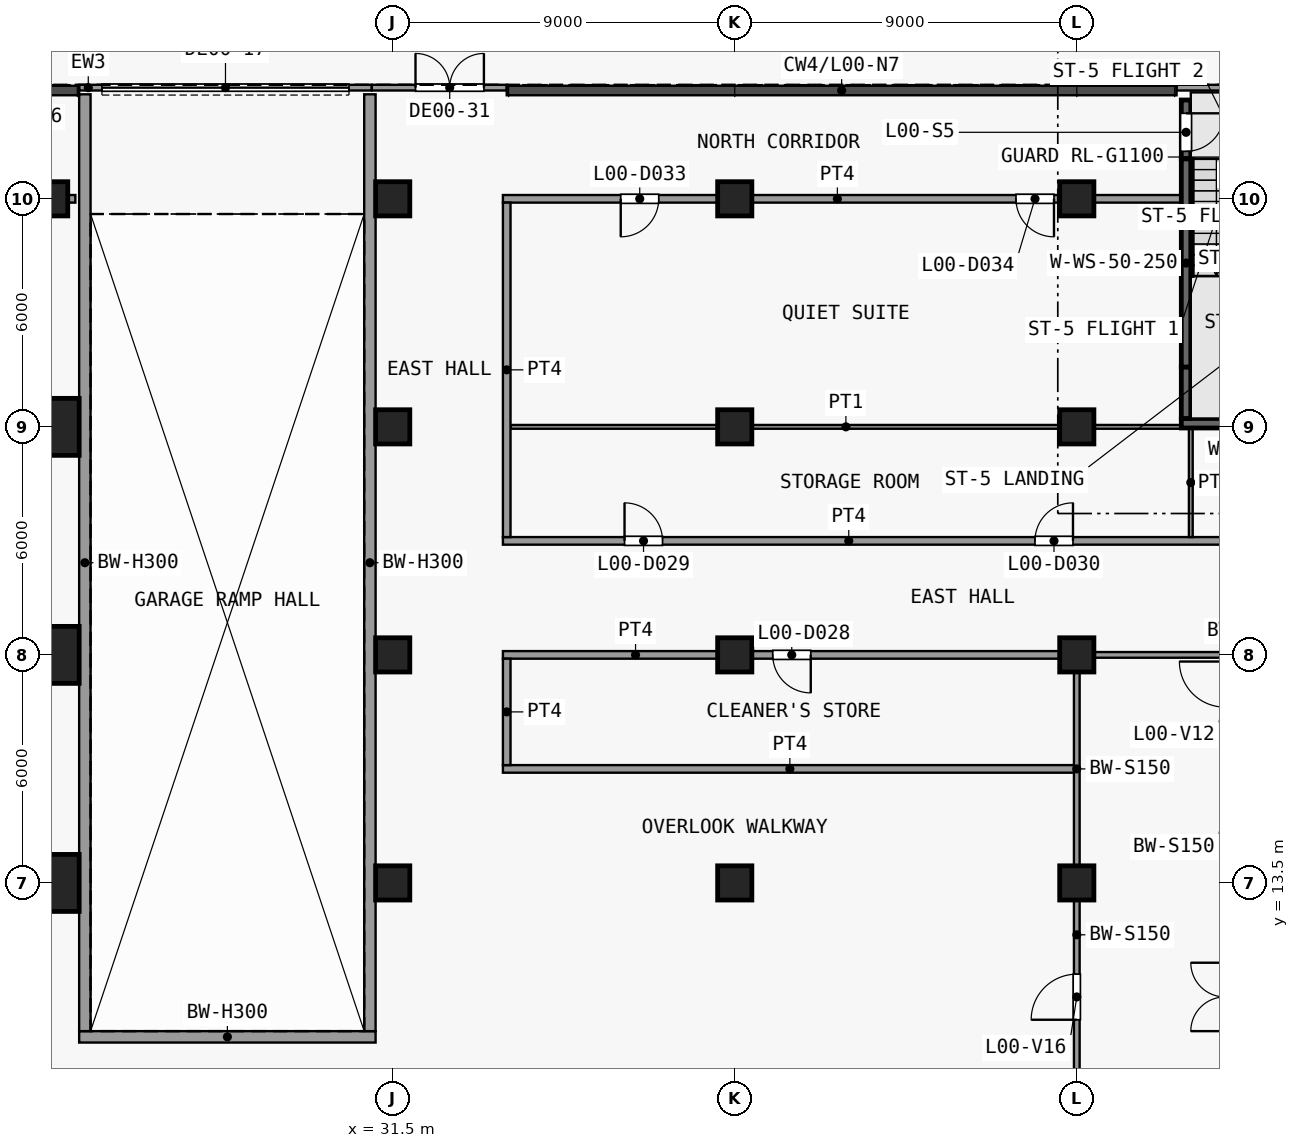
"""IFC4 building model, lengths in metres.
Left out: names, types, materials, properties, quantities, classifications, styles, units other than length and angle.
Written with IfcOpenShell. Run it as: python <this file> out.ifc"""

import sys

from ifc_helpers import new_model, si_unit, direction, frame, frame_2d, origin, origin_2d, place, context, subcontext, project, spatial, rectangle, extrude, element, fill, save


model = new_model("IFC4")
c1 = context("Model", 3, precision=1e-05, world=origin(), true_north=direction((0.0, 1.0)))
c2 = subcontext(c1, "Body", "Model", "MODEL_VIEW")
j1 = project(units=[si_unit("LENGTHUNIT", "METRE"), si_unit("PLANEANGLEUNIT", "RADIAN")], contexts=[c1])
p1 = place(None, origin())
s1 = spatial("IfcSite", under=j1, at=p1, CompositionType="ELEMENT")
p2 = place(p1, origin())
s2 = spatial("IfcBuilding", under=s1, at=p2, CompositionType="ELEMENT")
p3 = place(p2, origin())
s3 = spatial("IfcBuildingStorey", under=s2, at=p3, CompositionType="ELEMENT", Elevation=0.0)
for number, where, z_axis, x_axis in (
    (1, (22.5, 13.5, 0.0), (0.0, 0.0, 1.0), (1.0, 0.0, 0.0)),
    (2, (22.5, 19.5, 0.0), (0.0, 0.0, 1.0), (1.0, 0.0, 0.0)),
    (3, (22.5, 25.5, 0.0), (0.0, 0.0, 1.0), (1.0, 0.0, 0.0)),
):
    element("IfcColumn", number, at=place(p3, frame(where, z_axis=z_axis, x_axis=x_axis)), inside=s3, PredefinedType="COLUMN", context=c2, shape_type="SweptSolid", body=[
        extrude(rectangle(XDim=1.5, YDim=1.5, at=origin_2d()), origin(), (0.0, 0.0, 1.0), 8.0),
    ])
for number, where, z_axis, x_axis in (
    (4, (22.5, 31.5, 0.0), (0.0, 0.0, 1.0), (1.0, 0.0, 0.0)),
    (5, (31.5, 13.5, 0.0), (0.0, 0.0, 1.0), (1.0, 0.0, 0.0)),
    (6, (31.5, 19.5, 0.0), (0.0, 0.0, 1.0), (1.0, 0.0, 0.0)),
    (7, (31.5, 25.5, 0.0), (0.0, 0.0, 1.0), (1.0, 0.0, 0.0)),
    (8, (31.5, 31.5, 0.0), (0.0, 0.0, 1.0), (1.0, 0.0, 0.0)),
    (9, (40.5, 13.5, 0.0), (0.0, 0.0, 1.0), (1.0, 0.0, 0.0)),
    (10, (40.5, 19.5, 0.0), (0.0, 0.0, 1.0), (1.0, 0.0, 0.0)),
    (11, (40.5, 25.5, 0.0), (0.0, 0.0, 1.0), (1.0, 0.0, 0.0)),
    (12, (40.5, 31.5, 0.0), (0.0, 0.0, 1.0), (1.0, 0.0, 0.0)),
    (13, (49.5, 13.5, 0.0), (0.0, 0.0, 1.0), (1.0, 0.0, 0.0)),
    (14, (49.5, 19.5, 0.0), (0.0, 0.0, 1.0), (1.0, 0.0, 0.0)),
    (15, (49.5, 25.5, 0.0), (0.0, 0.0, 1.0), (1.0, 0.0, 0.0)),
    (16, (49.5, 31.5, 0.0), (0.0, 0.0, 1.0), (1.0, 0.0, 0.0)),
):
    element("IfcColumn", number, at=place(p3, frame(where, z_axis=z_axis, x_axis=x_axis)), inside=s3, PredefinedType="COLUMN", context=c2, shape_type="SweptSolid", body=[
        extrude(rectangle(XDim=0.9, YDim=0.9, at=origin_2d()), origin(), (0.0, 0.0, 1.0), 8.0),
    ])
p4 = place(p3, frame((23.25, 9.45, 0.0), z_axis=(0.0, 0.0, 1.0), x_axis=(1.0, 0.0, 0.0)))
e17 = element("IfcWall", 17, at=p4, inside=s3, PredefinedType="SOLIDWALL", context=c2, shape_type="SweptSolid", body=[
    extrude(rectangle(XDim=7.8, YDim=0.3, at=frame_2d((3.9, 0.0))), origin(), (0.0, 0.0, 1.0), 7.65),
])
p5 = place(p3, frame((49.95, 19.5, 0.0), z_axis=(0.0, 0.0, 1.0), x_axis=(1.0, 0.0, 0.0)))
e18 = element("IfcWall", 18, at=p5, inside=s3, PredefinedType="PARTITIONING", context=c2, shape_type="SweptSolid", body=[
    extrude(rectangle(XDim=8.1, YDim=0.15, at=frame_2d((4.05, 0.0))), origin(), (0.0, 0.0, 1.0), 7.65),
])
for number, where, z_axis, x_axis in (
    (19, (23.4, 9.6, 0.0), (0.0, 0.0, 1.0), (0.0, 1.0, 0.0)),
    (20, (30.9, 9.6, 0.0), (0.0, 0.0, 1.0), (0.0, 1.0, 0.0)),
):
    element("IfcWall", number, at=place(p3, frame(where, z_axis=z_axis, x_axis=x_axis)), inside=s3, PredefinedType="SOLIDWALL", context=c2, shape_type="SweptSolid", body=[
        extrude(rectangle(XDim=24.65, YDim=0.3, at=frame_2d((12.325, 0.0))), origin(), (0.0, 0.0, 1.0), 7.65),
    ])
p6 = place(p3, frame((49.5, 7.95, 0.0), z_axis=(0.0, 0.0, 1.0), x_axis=(0.0, 1.0, 0.0)))
e21 = element("IfcWall", 21, at=p6, inside=s3, PredefinedType="PARTITIONING", context=c2, shape_type="SweptSolid", body=[
    extrude(rectangle(XDim=5.1, YDim=0.15, at=frame_2d((2.55, 0.0))), origin(), (0.0, 0.0, 1.0), 7.65),
])
p7 = place(p6, frame((1.95, 0.0, 0.0)))
e22 = element("IfcOpeningElement", 22, at=p7, cuts=e21, PredefinedType="OPENING", context=c2, shape_type="SweptSolid", body=[
    extrude(rectangle(XDim=1.2, YDim=2.1, at=frame_2d((0.6, 1.05))), frame((0.0, 0.085, 0.0), z_axis=(0.0, -1.0, 0.0), x_axis=(1.0, 0.0, 0.0)), (0.0, 0.0, 1.0), 0.17),
])
p8 = place(p3, frame((49.5, 13.95, 0.0), z_axis=(0.0, 0.0, 1.0), x_axis=(0.0, 1.0, 0.0)))
e23 = element("IfcWall", 23, at=p8, inside=s3, PredefinedType="PARTITIONING", context=c2, shape_type="SweptSolid", body=[
    extrude(rectangle(XDim=5.1, YDim=0.15, at=frame_2d((2.55, 0.0))), origin(), (0.0, 0.0, 1.0), 7.65),
])
p9 = place(p3, frame((52.125, 34.425, 0.0), z_axis=(0.0, 0.0, 1.0), x_axis=(1.0, 0.0, 0.0)))
e24 = element("IfcWall", 24, at=p9, inside=s3, PredefinedType="SOLIDWALL", context=c2, shape_type="SweptSolid", body=[
    extrude(rectangle(XDim=3.6, YDim=0.15, at=frame_2d((1.8, 0.0))), origin(), (0.0, 0.0, 1.0), 7.65),
])
p10 = place(p9, frame((1.2, 0.0, 0.0)))
e25 = element("IfcOpeningElement", 25, at=p10, cuts=e24, PredefinedType="OPENING", context=c2, shape_type="SweptSolid", body=[
    extrude(rectangle(XDim=1.2, YDim=2.4, at=frame_2d((0.6, 1.2))), frame((0.0, 0.085, 0.0), z_axis=(0.0, -1.0, 0.0), x_axis=(1.0, 0.0, 0.0)), (0.0, 0.0, 1.0), 0.17),
])
p11 = place(p3, frame((23.25, 34.425, 0.0), z_axis=(0.0, 0.0, 1.0), x_axis=(1.0, 0.0, 0.0)))
e26 = element("IfcWall", 26, at=p11, inside=s3, PredefinedType="SOLIDWALL", context=c2, shape_type="SweptSolid", body=[
    extrude(rectangle(XDim=7.7, YDim=0.15, at=frame_2d((3.85, 0.0))), origin(), (0.0, 0.0, 1.0), 7.65),
])
p12 = place(p11, frame((0.6, 0.0, 0.0)))
e27 = element("IfcOpeningElement", 27, at=p12, cuts=e26, PredefinedType="OPENING", context=c2, shape_type="SweptSolid", body=[
    extrude(rectangle(XDim=6.5, YDim=4.5, at=frame_2d((3.25, 2.25))), frame((0.0, 0.085, 0.0), z_axis=(0.0, -1.0, 0.0), x_axis=(1.0, 0.0, 0.0)), (0.0, 0.0, 1.0), 0.17),
])
p13 = place(p3, frame((30.95, 34.425, 0.0), z_axis=(0.0, 0.0, 1.0), x_axis=(1.0, 0.0, 0.0)))
e28 = element("IfcWall", 28, at=p13, inside=s3, PredefinedType="SOLIDWALL", context=c2, shape_type="SweptSolid", body=[
    extrude(rectangle(XDim=3.55, YDim=0.15, at=frame_2d((1.775, 0.0))), origin(), (0.0, 0.0, 1.0), 7.65),
])
p14 = place(p13, frame((1.15, 0.0, 0.0)))
e29 = element("IfcOpeningElement", 29, at=p14, cuts=e28, PredefinedType="OPENING", context=c2, shape_type="SweptSolid", body=[
    extrude(rectangle(XDim=1.8, YDim=2.4, at=frame_2d((0.9, 1.2))), frame((0.0, 0.085, 0.0), z_axis=(0.0, -1.0, 0.0), x_axis=(1.0, 0.0, 0.0)), (0.0, 0.0, 1.0), 0.17),
])
p15 = place(p3, frame((52.375, 34.1, 0.0), z_axis=(0.0, 0.0, 1.0), x_axis=(0.0, -1.0, 0.0)))
e30 = element("IfcWall", 30, at=p15, inside=s3, PredefinedType="SHEAR", context=c2, shape_type="SweptSolid", body=[
    extrude(rectangle(XDim=1.55, YDim=0.25, at=frame_2d((0.775, 0.0))), origin(), (0.0, 0.0, 1.0), 7.65),
])
p16 = place(p15, frame((0.35, 0.0, 0.0)))
e31 = element("IfcOpeningElement", 31, at=p16, cuts=e30, PredefinedType="OPENING", context=c2, shape_type="SweptSolid", body=[
    extrude(rectangle(XDim=1.0, YDim=2.1, at=frame_2d((0.5, 1.05))), frame((0.0, 0.135, 0.0), z_axis=(0.0, -1.0, 0.0), x_axis=(1.0, 0.0, 0.0)), (0.0, 0.0, 1.0), 0.27),
])
p17 = place(p3, frame((52.375, 27.07, 0.0), z_axis=(0.0, 0.0, 1.0), x_axis=(0.0, 1.0, 0.0)))
e32 = element("IfcWall", 32, at=p17, inside=s3, PredefinedType="SHEAR", context=c2, shape_type="SweptSolid", body=[
    extrude(rectangle(XDim=5.48, YDim=0.25, at=frame_2d((2.74, 0.0))), origin(), (0.0, 0.0, 1.0), 7.65),
])
p18 = place(p3, frame((52.375, 25.72, 0.0), z_axis=(0.0, 0.0, 1.0), x_axis=(0.0, 1.0, 0.0)))
e33 = element("IfcWall", 33, at=p18, inside=s3, PredefinedType="SHEAR", context=c2, shape_type="SweptSolid", body=[
    extrude(rectangle(XDim=1.35, YDim=0.25, at=frame_2d((0.675, 0.0))), origin(), (0.0, 0.0, 1.0), 7.65),
])
p19 = place(p3, frame((52.25, 25.595, 0.0), z_axis=(0.0, 0.0, 1.0), x_axis=(1.0, 0.0, 0.0)))
e34 = element("IfcWall", 34, at=p19, inside=s3, PredefinedType="SHEAR", context=c2, shape_type="SweptSolid", body=[
    extrude(rectangle(XDim=3.35, YDim=0.25, at=frame_2d((1.675, 0.0))), origin(), (0.0, 0.0, 1.0), 7.65),
])
p20 = place(p3, frame((-31.6, 13.5, 0.0), z_axis=(0.0, 0.0, 1.0), x_axis=(1.0, 0.0, 0.0)))
e35 = element("IfcWall", 35, at=p20, inside=s3, PredefinedType="PARTITIONING", context=c2, shape_type="SweptSolid", body=[
    extrude(rectangle(XDim=54.75, YDim=0.2, at=frame_2d((27.375, 0.0))), origin(), (0.0, 0.0, 1.0), 7.65),
])
p21 = place(p20, frame((7.2, 0.0, 0.0)))
e36 = element("IfcOpeningElement", 36, at=p21, cuts=e35, PredefinedType="OPENING", context=c2, shape_type="SweptSolid", body=[
    extrude(rectangle(XDim=1.0, YDim=2.1, at=frame_2d((0.5, 1.05))), frame((0.0, 0.11, 0.0), z_axis=(0.0, -1.0, 0.0), x_axis=(1.0, 0.0, 0.0)), (0.0, 0.0, 1.0), 0.22),
])
p22 = place(p20, frame((34.2, 0.0, 0.0)))
e37 = element("IfcOpeningElement", 37, at=p22, cuts=e35, PredefinedType="OPENING", context=c2, shape_type="SweptSolid", body=[
    extrude(rectangle(XDim=1.0, YDim=2.1, at=frame_2d((0.5, 1.05))), frame((0.0, 0.11, 0.0), z_axis=(0.0, -1.0, 0.0), x_axis=(1.0, 0.0, 0.0)), (0.0, 0.0, 1.0), 0.22),
])
p23 = place(p20, frame((45.3, 0.0, 0.0)))
e38 = element("IfcOpeningElement", 38, at=p23, cuts=e35, PredefinedType="OPENING", context=c2, shape_type="SweptSolid", body=[
    extrude(rectangle(XDim=1.0, YDim=2.1, at=frame_2d((0.5, 1.05))), frame((0.0, 0.11, 0.0), z_axis=(0.0, -1.0, 0.0), x_axis=(1.0, 0.0, 0.0)), (0.0, 0.0, 1.0), 0.22),
])
p24 = place(p20, frame((52.0, 0.0, 0.0)))
e39 = element("IfcOpeningElement", 39, at=p24, cuts=e35, PredefinedType="OPENING", context=c2, shape_type="SweptSolid", body=[
    extrude(rectangle(XDim=1.0, YDim=2.1, at=frame_2d((0.5, 1.05))), frame((0.0, 0.11, 0.0), z_axis=(0.0, -1.0, 0.0), x_axis=(1.0, 0.0, 0.0)), (0.0, 0.0, 1.0), 0.22),
])
p25 = place(p3, frame((34.4, 16.5, 0.0), z_axis=(0.0, 0.0, 1.0), x_axis=(1.0, 0.0, 0.0)))
e40 = element("IfcWall", 40, at=p25, inside=s3, PredefinedType="PARTITIONING", context=c2, shape_type="SweptSolid", body=[
    extrude(rectangle(XDim=15.1, YDim=0.2, at=frame_2d((7.55, 0.0))), origin(), (0.0, 0.0, 1.0), 7.65),
])
p26 = place(p3, frame((-31.6, 19.5, 0.0), z_axis=(0.0, 0.0, 1.0), x_axis=(1.0, 0.0, 0.0)))
e41 = element("IfcWall", 41, at=p26, inside=s3, PredefinedType="PARTITIONING", context=c2, shape_type="SweptSolid", body=[
    extrude(rectangle(XDim=54.75, YDim=0.2, at=frame_2d((27.375, 0.0))), origin(), (0.0, 0.0, 1.0), 7.65),
])
p27 = place(p26, frame((7.2, 0.0, 0.0)))
e42 = element("IfcOpeningElement", 42, at=p27, cuts=e41, PredefinedType="OPENING", context=c2, shape_type="SweptSolid", body=[
    extrude(rectangle(XDim=1.0, YDim=2.1, at=frame_2d((0.5, 1.05))), frame((0.0, 0.11, 0.0), z_axis=(0.0, -1.0, 0.0), x_axis=(1.0, 0.0, 0.0)), (0.0, 0.0, 1.0), 0.22),
])
p28 = place(p26, frame((16.0, 0.0, 0.0)))
e43 = element("IfcOpeningElement", 43, at=p28, cuts=e41, PredefinedType="OPENING", context=c2, shape_type="SweptSolid", body=[
    extrude(rectangle(XDim=1.0, YDim=2.1, at=frame_2d((0.5, 1.05))), frame((0.0, 0.11, 0.0), z_axis=(0.0, -1.0, 0.0), x_axis=(1.0, 0.0, 0.0)), (0.0, 0.0, 1.0), 0.22),
])
p29 = place(p26, frame((32.5, 0.0, 0.0)))
e44 = element("IfcOpeningElement", 44, at=p29, cuts=e41, PredefinedType="OPENING", context=c2, shape_type="SweptSolid", body=[
    extrude(rectangle(XDim=1.0, YDim=2.1, at=frame_2d((0.5, 1.05))), frame((0.0, 0.11, 0.0), z_axis=(0.0, -1.0, 0.0), x_axis=(1.0, 0.0, 0.0)), (0.0, 0.0, 1.0), 0.22),
])
p30 = place(p26, frame((46.2, 0.0, 0.0)))
e45 = element("IfcOpeningElement", 45, at=p30, cuts=e41, PredefinedType="OPENING", context=c2, shape_type="SweptSolid", body=[
    extrude(rectangle(XDim=1.0, YDim=2.1, at=frame_2d((0.5, 1.05))), frame((0.0, 0.11, 0.0), z_axis=(0.0, -1.0, 0.0), x_axis=(1.0, 0.0, 0.0)), (0.0, 0.0, 1.0), 0.22),
])
p31 = place(p3, frame((34.4, 19.5, 0.0), z_axis=(0.0, 0.0, 1.0), x_axis=(1.0, 0.0, 0.0)))
e46 = element("IfcWall", 46, at=p31, inside=s3, PredefinedType="PARTITIONING", context=c2, shape_type="SweptSolid", body=[
    extrude(rectangle(XDim=15.1, YDim=0.2, at=frame_2d((7.55, 0.0))), origin(), (0.0, 0.0, 1.0), 7.65),
])
p32 = place(p31, frame((7.1, 0.0, 0.0)))
e47 = element("IfcOpeningElement", 47, at=p32, cuts=e46, PredefinedType="OPENING", context=c2, shape_type="SweptSolid", body=[
    extrude(rectangle(XDim=1.0, YDim=2.1, at=frame_2d((0.5, 1.05))), frame((0.0, 0.11, 0.0), z_axis=(0.0, -1.0, 0.0), x_axis=(1.0, 0.0, 0.0)), (0.0, 0.0, 1.0), 0.22),
])
p33 = place(p3, frame((34.4, 22.5, 0.0), z_axis=(0.0, 0.0, 1.0), x_axis=(1.0, 0.0, 0.0)))
e48 = element("IfcWall", 48, at=p33, inside=s3, PredefinedType="PARTITIONING", context=c2, shape_type="SweptSolid", body=[
    extrude(rectangle(XDim=24.2, YDim=0.2, at=frame_2d((12.1, 0.0))), origin(), (0.0, 0.0, 1.0), 7.65),
])
p34 = place(p33, frame((3.2, 0.0, 0.0)))
e49 = element("IfcOpeningElement", 49, at=p34, cuts=e48, PredefinedType="OPENING", context=c2, shape_type="SweptSolid", body=[
    extrude(rectangle(XDim=1.0, YDim=2.1, at=frame_2d((0.5, 1.05))), frame((0.0, 0.11, 0.0), z_axis=(0.0, -1.0, 0.0), x_axis=(1.0, 0.0, 0.0)), (0.0, 0.0, 1.0), 0.22),
])
p35 = place(p33, frame((14.0, 0.0, 0.0)))
e50 = element("IfcOpeningElement", 50, at=p35, cuts=e48, PredefinedType="OPENING", context=c2, shape_type="SweptSolid", body=[
    extrude(rectangle(XDim=1.0, YDim=2.1, at=frame_2d((0.5, 1.05))), frame((0.0, 0.11, 0.0), z_axis=(0.0, -1.0, 0.0), x_axis=(1.0, 0.0, 0.0)), (0.0, 0.0, 1.0), 0.22),
])
p36 = place(p3, frame((-25.5, 25.5, 0.0), z_axis=(0.0, 0.0, 1.0), x_axis=(1.0, 0.0, 0.0)))
e51 = element("IfcWall", 51, at=p36, inside=s3, PredefinedType="PARTITIONING", context=c2, shape_type="SweptSolid", body=[
    extrude(rectangle(XDim=48.65, YDim=0.1, at=frame_2d((24.325, 0.0))), origin(), (0.0, 0.0, 1.0), 7.65),
])
p37 = place(p3, frame((34.6, 25.5, 0.0), z_axis=(0.0, 0.0, 1.0), x_axis=(1.0, 0.0, 0.0)))
e52 = element("IfcWall", 52, at=p37, inside=s3, PredefinedType="PARTITIONING", context=c2, shape_type="SweptSolid", body=[
    extrude(rectangle(XDim=17.65, YDim=0.1, at=frame_2d((8.825, 0.0))), origin(), (0.0, 0.0, 1.0), 7.65),
])
p38 = place(p3, frame((-25.9, 31.5, 0.0), z_axis=(0.0, 0.0, 1.0), x_axis=(1.0, 0.0, 0.0)))
e53 = element("IfcWall", 53, at=p38, inside=s3, PredefinedType="PARTITIONING", context=c2, shape_type="SweptSolid", body=[
    extrude(rectangle(XDim=49.05, YDim=0.2, at=frame_2d((24.525, 0.0))), origin(), (0.0, 0.0, 1.0), 7.65),
])
p39 = place(p38, frame((10.0, 0.0, 0.0)))
e54 = element("IfcOpeningElement", 54, at=p39, cuts=e53, PredefinedType="OPENING", context=c2, shape_type="SweptSolid", body=[
    extrude(rectangle(XDim=1.0, YDim=2.1, at=frame_2d((0.5, 1.05))), frame((0.0, 0.11, 0.0), z_axis=(0.0, -1.0, 0.0), x_axis=(1.0, 0.0, 0.0)), (0.0, 0.0, 1.0), 0.22),
])
p40 = place(p38, frame((38.7, 0.0, 0.0)))
e55 = element("IfcOpeningElement", 55, at=p40, cuts=e53, PredefinedType="OPENING", context=c2, shape_type="SweptSolid", body=[
    extrude(rectangle(XDim=1.0, YDim=2.1, at=frame_2d((0.5, 1.05))), frame((0.0, 0.11, 0.0), z_axis=(0.0, -1.0, 0.0), x_axis=(1.0, 0.0, 0.0)), (0.0, 0.0, 1.0), 0.22),
])
p41 = place(p3, frame((34.4, 31.5, 0.0), z_axis=(0.0, 0.0, 1.0), x_axis=(1.0, 0.0, 0.0)))
e56 = element("IfcWall", 56, at=p41, inside=s3, PredefinedType="PARTITIONING", context=c2, shape_type="SweptSolid", body=[
    extrude(rectangle(XDim=17.85, YDim=0.2, at=frame_2d((8.925, 0.0))), origin(), (0.0, 0.0, 1.0), 7.65),
])
p42 = place(p41, frame((3.1, 0.0, 0.0)))
e57 = element("IfcOpeningElement", 57, at=p42, cuts=e56, PredefinedType="OPENING", context=c2, shape_type="SweptSolid", body=[
    extrude(rectangle(XDim=1.0, YDim=2.1, at=frame_2d((0.5, 1.05))), frame((0.0, 0.11, 0.0), z_axis=(0.0, -1.0, 0.0), x_axis=(1.0, 0.0, 0.0)), (0.0, 0.0, 1.0), 0.22),
])
p43 = place(p41, frame((13.5, 0.0, 0.0)))
e58 = element("IfcOpeningElement", 58, at=p43, cuts=e56, PredefinedType="OPENING", context=c2, shape_type="SweptSolid", body=[
    extrude(rectangle(XDim=1.0, YDim=2.1, at=frame_2d((0.5, 1.05))), frame((0.0, 0.11, 0.0), z_axis=(0.0, -1.0, 0.0), x_axis=(1.0, 0.0, 0.0)), (0.0, 0.0, 1.0), 0.22),
])
p44 = place(p3, frame((34.5, 16.6, 0.0), z_axis=(0.0, 0.0, 1.0), x_axis=(0.0, 1.0, 0.0)))
e59 = element("IfcWall", 59, at=p44, inside=s3, PredefinedType="PARTITIONING", context=c2, shape_type="SweptSolid", body=[
    extrude(rectangle(XDim=2.8, YDim=0.2, at=frame_2d((1.4, 0.0))), origin(), (0.0, 0.0, 1.0), 7.65),
])
p45 = place(p3, frame((34.5, 22.6, 0.0), z_axis=(0.0, 0.0, 1.0), x_axis=(0.0, 1.0, 0.0)))
e60 = element("IfcWall", 60, at=p45, inside=s3, PredefinedType="PARTITIONING", context=c2, shape_type="SweptSolid", body=[
    extrude(rectangle(XDim=8.8, YDim=0.2, at=frame_2d((4.4, 0.0))), origin(), (0.0, 0.0, 1.0), 7.65),
])
p46 = place(p3, frame((52.5, 22.6, 0.0), z_axis=(0.0, 0.0, 1.0), x_axis=(0.0, 1.0, 0.0)))
e61 = element("IfcWall", 61, at=p46, inside=s3, PredefinedType="PARTITIONING", context=c2, shape_type="SweptSolid", body=[
    extrude(rectangle(XDim=2.87, YDim=0.1, at=frame_2d((1.435, 0.0))), origin(), (0.0, 0.0, 1.0), 7.65),
])
p47 = place(p7, origin())
e62 = element("IfcDoor", 62, at=p47, inside=s3, OperationType="SINGLE_SWING_LEFT", PredefinedType="DOOR", context=c2, shape_type="SweptSolid", body=[
    extrude(rectangle(XDim=1.2, YDim=2.1, at=frame_2d((0.6, 1.05))), frame((0.0, 0.025, 0.0), z_axis=(0.0, -1.0, 0.0), x_axis=(1.0, 0.0, 0.0)), (0.0, 0.0, 1.0), 0.05),
])
fill(e22, e62)
p48 = place(p12, origin())
e63 = element("IfcDoor", 63, at=p48, inside=s3, OperationType="ROLLINGUP", PredefinedType="DOOR", context=c2, shape_type="SweptSolid", body=[
    extrude(rectangle(XDim=6.5, YDim=4.5, at=frame_2d((3.25, 2.25))), frame((0.0, 0.025, 0.0), z_axis=(0.0, -1.0, 0.0), x_axis=(1.0, 0.0, 0.0)), (0.0, 0.0, 1.0), 0.05),
])
fill(e27, e63)
p49 = place(p14, origin())
e64 = element("IfcDoor", 64, at=p49, inside=s3, OperationType="DOUBLE_DOOR_SINGLE_SWING", PredefinedType="DOOR", context=c2, shape_type="SweptSolid", body=[
    extrude(rectangle(XDim=1.8, YDim=2.4, at=frame_2d((0.9, 1.2))), frame((0.0, 0.025, 0.0), z_axis=(0.0, -1.0, 0.0), x_axis=(1.0, 0.0, 0.0)), (0.0, 0.0, 1.0), 0.05),
])
fill(e29, e64)
p50 = place(p16, origin())
e65 = element("IfcDoor", 65, at=p50, inside=s3, OperationType="SINGLE_SWING_LEFT", PredefinedType="DOOR", context=c2, shape_type="SweptSolid", body=[
    extrude(rectangle(XDim=1.0, YDim=2.1, at=frame_2d((0.5, 1.05))), frame((0.0, 0.025, 0.0), z_axis=(0.0, -1.0, 0.0), x_axis=(1.0, 0.0, 0.0)), (0.0, 0.0, 1.0), 0.05),
])
fill(e31, e65)
p51 = place(p32, origin())
e66 = element("IfcDoor", 66, at=p51, inside=s3, OperationType="SINGLE_SWING_RIGHT", PredefinedType="DOOR", context=c2, shape_type="SweptSolid", body=[
    extrude(rectangle(XDim=1.0, YDim=2.1, at=frame_2d((0.5, 1.05))), frame((0.0, 0.025, 0.0), z_axis=(0.0, -1.0, 0.0), x_axis=(1.0, 0.0, 0.0)), (0.0, 0.0, 1.0), 0.05),
])
fill(e47, e66)
p52 = place(p34, origin())
e67 = element("IfcDoor", 67, at=p52, inside=s3, OperationType="SINGLE_SWING_RIGHT", PredefinedType="DOOR", context=c2, shape_type="SweptSolid", body=[
    extrude(rectangle(XDim=1.0, YDim=2.1, at=frame_2d((0.5, 1.05))), frame((0.0, 0.025, 0.0), z_axis=(0.0, -1.0, 0.0), x_axis=(1.0, 0.0, 0.0)), (0.0, 0.0, 1.0), 0.05),
])
fill(e49, e67)
p53 = place(p35, origin())
e68 = element("IfcDoor", 68, at=p53, inside=s3, OperationType="SINGLE_SWING_LEFT", PredefinedType="DOOR", context=c2, shape_type="SweptSolid", body=[
    extrude(rectangle(XDim=1.0, YDim=2.1, at=frame_2d((0.5, 1.05))), frame((0.0, 0.025, 0.0), z_axis=(0.0, -1.0, 0.0), x_axis=(1.0, 0.0, 0.0)), (0.0, 0.0, 1.0), 0.05),
])
fill(e50, e68)
p54 = place(p42, origin())
e69 = element("IfcDoor", 69, at=p54, inside=s3, OperationType="SINGLE_SWING_LEFT", PredefinedType="DOOR", context=c2, shape_type="SweptSolid", body=[
    extrude(rectangle(XDim=1.0, YDim=2.1, at=frame_2d((0.5, 1.05))), frame((0.0, 0.025, 0.0), z_axis=(0.0, -1.0, 0.0), x_axis=(1.0, 0.0, 0.0)), (0.0, 0.0, 1.0), 0.05),
])
fill(e57, e69)
p55 = place(p43, origin())
e70 = element("IfcDoor", 70, at=p55, inside=s3, OperationType="SINGLE_SWING_RIGHT", PredefinedType="DOOR", context=c2, shape_type="SweptSolid", body=[
    extrude(rectangle(XDim=1.0, YDim=2.1, at=frame_2d((0.5, 1.05))), frame((0.0, 0.025, 0.0), z_axis=(0.0, -1.0, 0.0), x_axis=(1.0, 0.0, 0.0)), (0.0, 0.0, 1.0), 0.05),
])
fill(e58, e70)
save(model, sys.argv[1])
